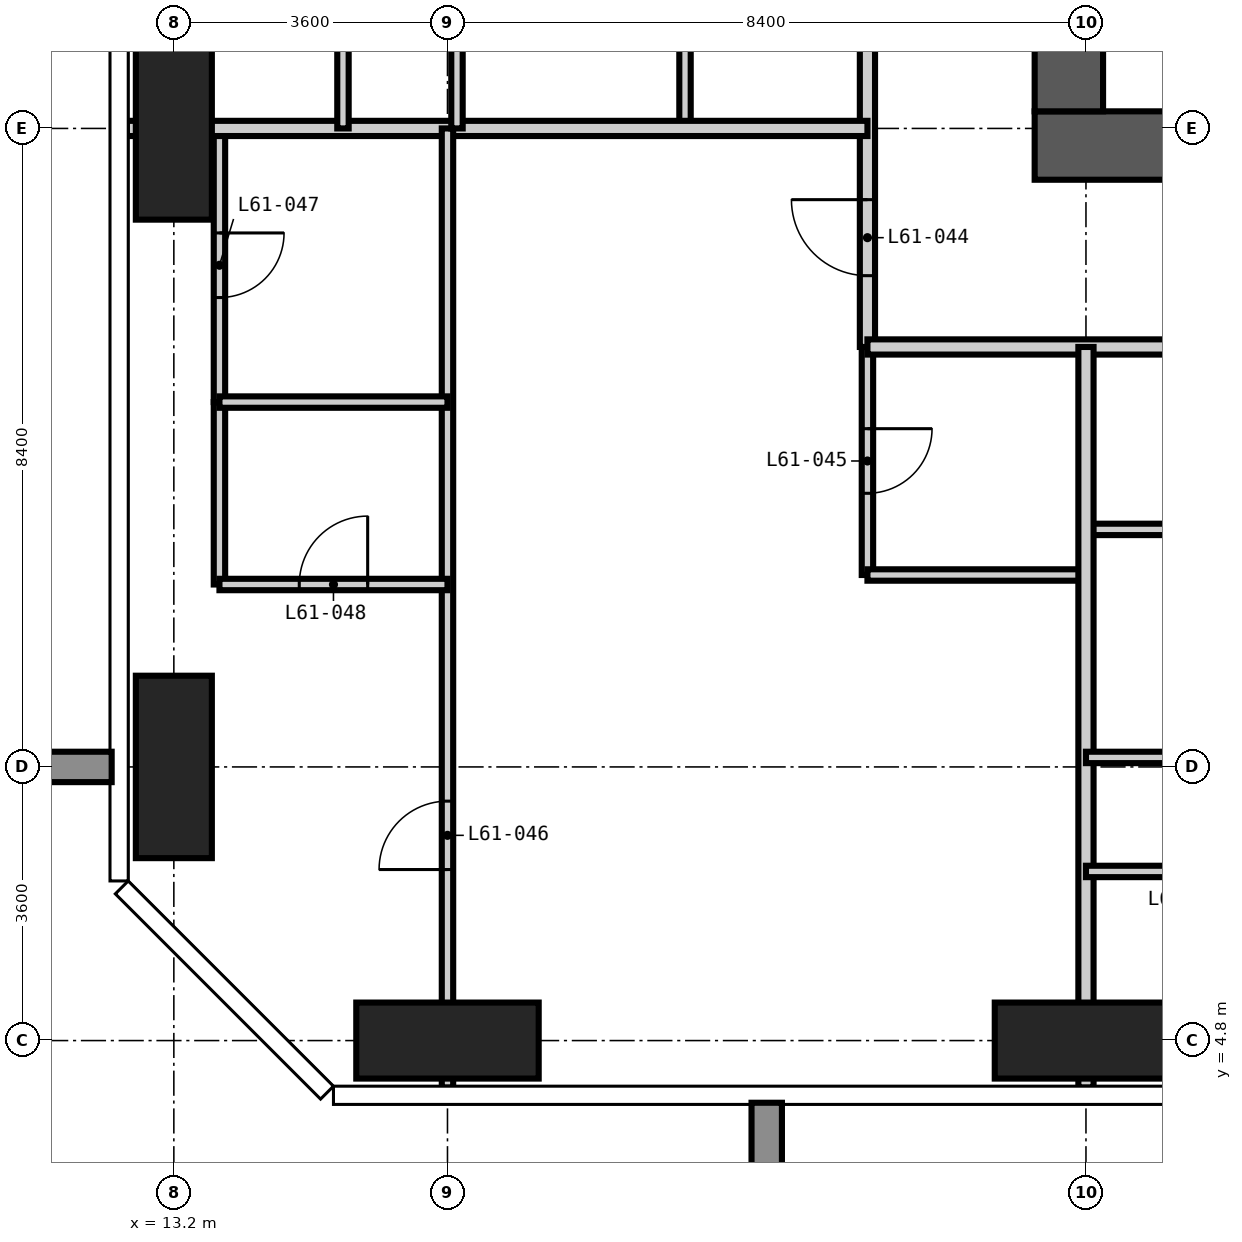
"""IFC4 building model, lengths in metres.
Left out: names, types, materials, properties, quantities, classifications, styles, units other than length and angle.
Written with IfcOpenShell. Run it as: python <this file> out.ifc"""

import sys

from ifc_helpers import new_model, si_unit, direction, frame, frame_2d, origin, origin_2d, place, context, subcontext, project, spatial, rectangle, extrude, element, fill, save


model = new_model("IFC4")
c1 = context("Model", 3, precision=1e-05, world=origin(), true_north=direction((0.0, 1.0)))
c2 = subcontext(c1, "Body", "Model", "MODEL_VIEW")
j1 = project(units=[si_unit("LENGTHUNIT", "METRE"), si_unit("PLANEANGLEUNIT", "RADIAN")], contexts=[c1])
p1 = place(None, origin())
s1 = spatial("IfcSite", under=j1, at=p1, CompositionType="ELEMENT")
p2 = place(p1, origin())
s2 = spatial("IfcBuilding", under=s1, at=p2, CompositionType="ELEMENT")
p3 = place(p2, frame((0.0, 0.0, 237.3)))
s3 = spatial("IfcBuildingStorey", under=s2, at=p3, CompositionType="ELEMENT", Elevation=237.3)
for number, where, z_axis, x_axis in (
    (1, (13.2, 8.4, -0.35), (0.0, 0.0, 1.0), (1.0, 0.0, 0.0)),
    (2, (13.2, 16.8, -0.35), (0.0, 0.0, 1.0), (1.0, 0.0, 0.0)),
):
    element("IfcColumn", number, at=place(p3, frame(where, z_axis=z_axis, x_axis=x_axis)), inside=s3, PredefinedType="COLUMN", context=c2, shape_type="SweptSolid", body=[
        extrude(rectangle(XDim=1.0, YDim=2.4, at=origin_2d()), origin(), (0.0, 0.0, 1.0), 3.9),
    ])
for number, where, z_axis, x_axis in (
    (3, (16.8, 4.8, -0.35), (0.0, 0.0, 1.0), (1.0, 0.0, 0.0)),
    (4, (25.2, 4.8, -0.35), (0.0, 0.0, 1.0), (1.0, 0.0, 0.0)),
):
    element("IfcColumn", number, at=place(p3, frame(where, z_axis=z_axis, x_axis=x_axis)), inside=s3, PredefinedType="COLUMN", context=c2, shape_type="SweptSolid", body=[
        extrude(rectangle(XDim=2.4, YDim=1.0, at=origin_2d()), origin(), (0.0, 0.0, 1.0), 3.9),
    ])
p4 = place(p3, frame((24.525, 16.575, -0.35), z_axis=(0.0, 0.0, 1.0), x_axis=(1.0, 0.0, 0.0)))
e5 = element("IfcWall", 5, at=p4, inside=s3, PredefinedType="SHEAR", context=c2, shape_type="SweptSolid", body=[
    extrude(rectangle(XDim=18.15, YDim=0.9, at=frame_2d((9.075, 0.0))), origin(), (0.0, 0.0, 1.0), 3.9),
])
p5 = place(p4, frame((4.375, 0.0, 0.35)))
e6 = element("IfcOpeningElement", 6, at=p5, cuts=e5, PredefinedType="OPENING", context=c2, shape_type="SweptSolid", body=[
    extrude(rectangle(XDim=1.0, YDim=2.1, at=frame_2d((0.5, 1.05))), frame((0.0, 0.46, 0.0), z_axis=(0.0, -1.0, 0.0), x_axis=(1.0, 0.0, 0.0)), (0.0, 0.0, 1.0), 0.92),
])
p6 = place(p4, frame((10.675, 0.0, 0.35)))
e7 = element("IfcOpeningElement", 7, at=p6, cuts=e5, PredefinedType="OPENING", context=c2, shape_type="SweptSolid", body=[
    extrude(rectangle(XDim=1.0, YDim=2.1, at=frame_2d((0.5, 1.05))), frame((0.0, 0.46, 0.0), z_axis=(0.0, -1.0, 0.0), x_axis=(1.0, 0.0, 0.0)), (0.0, 0.0, 1.0), 0.92),
])
p7 = place(p3, frame((24.975, 41.775, -0.35), z_axis=(0.0, 0.0, 1.0), x_axis=(0.0, -1.0, 0.0)))
e8 = element("IfcWall", 8, at=p7, inside=s3, PredefinedType="SHEAR", context=c2, shape_type="SweptSolid", body=[
    extrude(rectangle(XDim=24.75, YDim=0.9, at=frame_2d((12.375, 0.0))), origin(), (0.0, 0.0, 1.0), 3.9),
])
p8 = place(p7, frame((11.875, 0.0, 0.35)))
e9 = element("IfcOpeningElement", 9, at=p8, cuts=e8, PredefinedType="OPENING", context=c2, shape_type="SweptSolid", body=[
    extrude(rectangle(XDim=1.0, YDim=2.1, at=frame_2d((0.5, 1.05))), frame((0.0, 0.46, 0.0), z_axis=(0.0, -1.0, 0.0), x_axis=(1.0, 0.0, 0.0)), (0.0, 0.0, 1.0), 0.92),
])
p9 = place(p3, frame((13.8, 13.2, 0.0), z_axis=(0.0, 0.0, 1.0), x_axis=(0.0, 1.0, 0.0)))
e10 = element("IfcWall", 10, at=p9, inside=s3, PredefinedType="PARTITIONING", context=c2, shape_type="SweptSolid", body=[
    extrude(rectangle(XDim=3.6, YDim=0.15, at=frame_2d((1.8, 0.0))), origin(), (0.0, 0.0, 1.0), 3.55),
])
p10 = place(p9, frame((1.375, 0.0, 0.0)))
e11 = element("IfcOpeningElement", 11, at=p10, cuts=e10, PredefinedType="OPENING", context=c2, shape_type="SweptSolid", body=[
    extrude(rectangle(XDim=0.85, YDim=2.1, at=frame_2d((0.425, 1.05))), frame((0.0, 0.085, 0.0), z_axis=(0.0, -1.0, 0.0), x_axis=(1.0, 0.0, 0.0)), (0.0, 0.0, 1.0), 0.17),
])
p11 = place(p3, frame((19.925, 16.8, 0.0), z_axis=(0.0, 0.0, 1.0), x_axis=(0.0, 1.0, 0.0)))
e12 = element("IfcWall", 12, at=p11, inside=s3, PredefinedType="PARTITIONING", context=c2, shape_type="SweptSolid", body=[
    extrude(rectangle(XDim=3.0, YDim=0.15, at=frame_2d((1.5, 0.0))), origin(), (0.0, 0.0, 1.0), 3.55),
])
p12 = place(p11, frame((1.075, 0.0, 0.0)))
e13 = element("IfcOpeningElement", 13, at=p12, cuts=e12, PredefinedType="OPENING", context=c2, shape_type="SweptSolid", body=[
    extrude(rectangle(XDim=0.85, YDim=2.1, at=frame_2d((0.425, 1.05))), frame((0.0, 0.085, 0.0), z_axis=(0.0, -1.0, 0.0), x_axis=(1.0, 0.0, 0.0)), (0.0, 0.0, 1.0), 0.17),
])
p13 = place(p3, frame((22.325, 10.925, 0.0), z_axis=(0.0, 0.0, 1.0), x_axis=(0.0, 1.0, 0.0)))
e14 = element("IfcWall", 14, at=p13, inside=s3, PredefinedType="PARTITIONING", context=c2, shape_type="SweptSolid", body=[
    extrude(rectangle(XDim=3.0, YDim=0.15, at=frame_2d((1.5, 0.0))), origin(), (0.0, 0.0, 1.0), 3.55),
])
p14 = place(p13, frame((1.075, 0.0, 0.0)))
e15 = element("IfcOpeningElement", 15, at=p14, cuts=e14, PredefinedType="OPENING", context=c2, shape_type="SweptSolid", body=[
    extrude(rectangle(XDim=0.85, YDim=2.1, at=frame_2d((0.425, 1.05))), frame((0.0, 0.085, 0.0), z_axis=(0.0, -1.0, 0.0), x_axis=(1.0, 0.0, 0.0)), (0.0, 0.0, 1.0), 0.17),
])
p15 = place(p3, frame((22.325, 10.925, 0.0), z_axis=(0.0, 0.0, 1.0), x_axis=(1.0, 0.0, 0.0)))
e16 = element("IfcWall", 16, at=p15, inside=s3, PredefinedType="PARTITIONING", context=c2, shape_type="SweptSolid", body=[
    extrude(rectangle(XDim=2.875, YDim=0.15, at=frame_2d((1.438, 0.0))), origin(), (0.0, 0.0, 1.0), 3.55),
])
p16 = place(p3, frame((25.2, 11.525, 0.0), z_axis=(0.0, 0.0, 1.0), x_axis=(1.0, 0.0, 0.0)))
e17 = element("IfcWall", 17, at=p16, inside=s3, PredefinedType="PARTITIONING", context=c2, shape_type="SweptSolid", body=[
    extrude(rectangle(XDim=3.0, YDim=0.15, at=frame_2d((1.5, 0.0))), origin(), (0.0, 0.0, 1.0), 3.55),
])
p17 = place(p3, frame((22.325, 13.925, 0.0), z_axis=(0.0, 0.0, 1.0), x_axis=(0.0, 1.0, 0.0)))
e18 = element("IfcWall", 18, at=p17, inside=s3, PredefinedType="PARTITIONING", context=c2, shape_type="SweptSolid", body=[
    extrude(rectangle(XDim=30.65, YDim=0.2, at=frame_2d((15.325, 0.0))), origin(), (0.0, 0.0, 1.0), 3.55),
])
p18 = place(p17, frame((8.675, 0.0, 0.0)))
e19 = element("IfcOpeningElement", 19, at=p18, cuts=e18, PredefinedType="OPENING", context=c2, shape_type="SweptSolid", body=[
    extrude(rectangle(XDim=1.0, YDim=2.2, at=frame_2d((0.5, 1.1))), frame((0.0, 0.11, 0.0), z_axis=(0.0, -1.0, 0.0), x_axis=(1.0, 0.0, 0.0)), (0.0, 0.0, 1.0), 0.22),
])
p19 = place(p17, frame((21.275, 0.0, 0.0)))
e20 = element("IfcOpeningElement", 20, at=p19, cuts=e18, PredefinedType="OPENING", context=c2, shape_type="SweptSolid", body=[
    extrude(rectangle(XDim=1.0, YDim=2.2, at=frame_2d((0.5, 1.1))), frame((0.0, 0.11, 0.0), z_axis=(0.0, -1.0, 0.0), x_axis=(1.0, 0.0, 0.0)), (0.0, 0.0, 1.0), 0.22),
])
p20 = place(p17, frame((0.938, 0.0, 0.0)))
e21 = element("IfcOpeningElement", 21, at=p20, cuts=e18, PredefinedType="OPENING", context=c2, shape_type="SweptSolid", body=[
    extrude(rectangle(XDim=1.0, YDim=2.2, at=frame_2d((0.5, 1.1))), frame((0.0, 0.11, 0.0), z_axis=(0.0, -1.0, 0.0), x_axis=(1.0, 0.0, 0.0)), (0.0, 0.0, 1.0), 0.22),
])
p21 = place(p17, frame((28.863, 0.0, 0.0)))
e22 = element("IfcOpeningElement", 22, at=p21, cuts=e18, PredefinedType="OPENING", context=c2, shape_type="SweptSolid", body=[
    extrude(rectangle(XDim=1.0, YDim=2.2, at=frame_2d((0.5, 1.1))), frame((0.0, 0.11, 0.0), z_axis=(0.0, -1.0, 0.0), x_axis=(1.0, 0.0, 0.0)), (0.0, 0.0, 1.0), 0.22),
])
p22 = place(p3, frame((45.175, 13.925, 0.0), z_axis=(0.0, 0.0, 1.0), x_axis=(-1.0, 0.0, 0.0)))
e23 = element("IfcWall", 23, at=p22, inside=s3, PredefinedType="PARTITIONING", context=c2, shape_type="SweptSolid", body=[
    extrude(rectangle(XDim=22.85, YDim=0.2, at=frame_2d((11.425, 0.0))), origin(), (0.0, 0.0, 1.0), 3.55),
])
p23 = place(p22, frame((15.275, 0.0, 0.0)))
e24 = element("IfcOpeningElement", 24, at=p23, cuts=e23, PredefinedType="OPENING", context=c2, shape_type="SweptSolid", body=[
    extrude(rectangle(XDim=1.0, YDim=2.2, at=frame_2d((0.5, 1.1))), frame((0.0, 0.11, 0.0), z_axis=(0.0, -1.0, 0.0), x_axis=(1.0, 0.0, 0.0)), (0.0, 0.0, 1.0), 0.22),
])
p24 = place(p22, frame((6.875, 0.0, 0.0)))
e25 = element("IfcOpeningElement", 25, at=p24, cuts=e23, PredefinedType="OPENING", context=c2, shape_type="SweptSolid", body=[
    extrude(rectangle(XDim=1.0, YDim=2.2, at=frame_2d((0.5, 1.1))), frame((0.0, 0.11, 0.0), z_axis=(0.0, -1.0, 0.0), x_axis=(1.0, 0.0, 0.0)), (0.0, 0.0, 1.0), 0.22),
])
p25 = place(p3, frame((25.2, 4.182, 0.0), z_axis=(0.0, 0.0, 1.0), x_axis=(0.0, 1.0, 0.0)))
e26 = element("IfcWall", 26, at=p25, inside=s3, PredefinedType="PARTITIONING", context=c2, shape_type="SweptSolid", body=[
    extrude(rectangle(XDim=9.743, YDim=0.2, at=frame_2d((4.872, 0.0))), origin(), (0.0, 0.0, 1.0), 3.55),
])
p26 = place(p3, frame((12.582, 16.8, 0.0), z_axis=(0.0, 0.0, 1.0), x_axis=(1.0, 0.0, 0.0)))
e27 = element("IfcWall", 27, at=p26, inside=s3, PredefinedType="PARTITIONING", context=c2, shape_type="SweptSolid", body=[
    extrude(rectangle(XDim=9.743, YDim=0.2, at=frame_2d((4.872, 0.0))), origin(), (0.0, 0.0, 1.0), 3.55),
])
p27 = place(p3, frame((13.8, 10.8, 0.0), z_axis=(0.0, 0.0, 1.0), x_axis=(0.0, 1.0, 0.0)))
e28 = element("IfcWall", 28, at=p27, inside=s3, PredefinedType="PARTITIONING", context=c2, shape_type="SweptSolid", body=[
    extrude(rectangle(XDim=2.4, YDim=0.15, at=frame_2d((1.2, 0.0))), origin(), (0.0, 0.0, 1.0), 3.55),
])
p28 = place(p3, frame((15.425, 16.8, 0.0), z_axis=(0.0, 0.0, 1.0), x_axis=(0.0, 1.0, 0.0)))
e29 = element("IfcWall", 29, at=p28, inside=s3, PredefinedType="PARTITIONING", context=c2, shape_type="SweptSolid", body=[
    extrude(rectangle(XDim=3.0, YDim=0.15, at=frame_2d((1.5, 0.0))), origin(), (0.0, 0.0, 1.0), 3.55),
])
p29 = place(p28, frame((1.05, 0.0, 0.0)))
e30 = element("IfcOpeningElement", 30, at=p29, cuts=e29, PredefinedType="OPENING", context=c2, shape_type="SweptSolid", body=[
    extrude(rectangle(XDim=0.9, YDim=2.1, at=frame_2d((0.45, 1.05))), frame((0.0, 0.085, 0.0), z_axis=(0.0, -1.0, 0.0), x_axis=(1.0, 0.0, 0.0)), (0.0, 0.0, 1.0), 0.17),
])
p30 = place(p3, frame((16.8, 4.182, 0.0), z_axis=(0.0, 0.0, 1.0), x_axis=(0.0, 1.0, 0.0)))
e31 = element("IfcWall", 31, at=p30, inside=s3, PredefinedType="PARTITIONING", context=c2, shape_type="SweptSolid", body=[
    extrude(rectangle(XDim=12.618, YDim=0.15, at=frame_2d((6.309, 0.0))), origin(), (0.0, 0.0, 1.0), 3.55),
])
p31 = place(p30, frame((2.868, 0.0, 0.0)))
e32 = element("IfcOpeningElement", 32, at=p31, cuts=e31, PredefinedType="OPENING", context=c2, shape_type="SweptSolid", body=[
    extrude(rectangle(XDim=0.9, YDim=2.1, at=frame_2d((0.45, 1.05))), frame((0.0, 0.085, 0.0), z_axis=(0.0, -1.0, 0.0), x_axis=(1.0, 0.0, 0.0)), (0.0, 0.0, 1.0), 0.17),
])
p32 = place(p3, frame((16.925, 16.8, 0.0), z_axis=(0.0, 0.0, 1.0), x_axis=(0.0, 1.0, 0.0)))
e33 = element("IfcWall", 33, at=p32, inside=s3, PredefinedType="PARTITIONING", context=c2, shape_type="SweptSolid", body=[
    extrude(rectangle(XDim=3.0, YDim=0.15, at=frame_2d((1.5, 0.0))), origin(), (0.0, 0.0, 1.0), 3.55),
])
p33 = place(p3, frame((25.2, 7.025, 0.0), z_axis=(0.0, 0.0, 1.0), x_axis=(1.0, 0.0, 0.0)))
e34 = element("IfcWall", 34, at=p33, inside=s3, PredefinedType="PARTITIONING", context=c2, shape_type="SweptSolid", body=[
    extrude(rectangle(XDim=3.0, YDim=0.15, at=frame_2d((1.5, 0.0))), origin(), (0.0, 0.0, 1.0), 3.55),
])
p34 = place(p33, frame((1.05, 0.0, 0.0)))
e35 = element("IfcOpeningElement", 35, at=p34, cuts=e34, PredefinedType="OPENING", context=c2, shape_type="SweptSolid", body=[
    extrude(rectangle(XDim=0.9, YDim=2.1, at=frame_2d((0.45, 1.05))), frame((0.0, 0.085, 0.0), z_axis=(0.0, -1.0, 0.0), x_axis=(1.0, 0.0, 0.0)), (0.0, 0.0, 1.0), 0.17),
])
p35 = place(p3, frame((25.2, 8.525, 0.0), z_axis=(0.0, 0.0, 1.0), x_axis=(1.0, 0.0, 0.0)))
e36 = element("IfcWall", 36, at=p35, inside=s3, PredefinedType="PARTITIONING", context=c2, shape_type="SweptSolid", body=[
    extrude(rectangle(XDim=3.0, YDim=0.15, at=frame_2d((1.5, 0.0))), origin(), (0.0, 0.0, 1.0), 3.55),
])
p36 = place(p3, frame((13.8, 10.8, 0.0), z_axis=(0.0, 0.0, 1.0), x_axis=(1.0, 0.0, 0.0)))
e37 = element("IfcWall", 37, at=p36, inside=s3, PredefinedType="PARTITIONING", context=c2, shape_type="SweptSolid", body=[
    extrude(rectangle(XDim=3.0, YDim=0.15, at=frame_2d((1.5, 0.0))), origin(), (0.0, 0.0, 1.0), 3.55),
])
p37 = place(p36, frame((1.05, 0.0, 0.0)))
e38 = element("IfcOpeningElement", 38, at=p37, cuts=e37, PredefinedType="OPENING", context=c2, shape_type="SweptSolid", body=[
    extrude(rectangle(XDim=0.9, YDim=2.1, at=frame_2d((0.45, 1.05))), frame((0.0, 0.085, 0.0), z_axis=(0.0, -1.0, 0.0), x_axis=(1.0, 0.0, 0.0)), (0.0, 0.0, 1.0), 0.17),
])
p38 = place(p3, frame((13.8, 13.2, 0.0), z_axis=(0.0, 0.0, 1.0), x_axis=(1.0, 0.0, 0.0)))
e39 = element("IfcWall", 39, at=p38, inside=s3, PredefinedType="PARTITIONING", context=c2, shape_type="SweptSolid", body=[
    extrude(rectangle(XDim=3.0, YDim=0.15, at=frame_2d((1.5, 0.0))), origin(), (0.0, 0.0, 1.0), 3.55),
])
p39 = place(p20, origin())
e40 = element("IfcDoor", 40, at=p39, inside=s3, OperationType="SINGLE_SWING_RIGHT", PredefinedType="DOOR", context=c2, shape_type="SweptSolid", body=[
    extrude(rectangle(XDim=1.0, YDim=2.2, at=frame_2d((0.5, 1.1))), frame((0.0, 0.025, 0.0), z_axis=(0.0, -1.0, 0.0), x_axis=(1.0, 0.0, 0.0)), (0.0, 0.0, 1.0), 0.05),
])
fill(e21, e40)
p40 = place(p14, frame((0.85, 0.0, 0.0), z_axis=(0.0, 0.0, 1.0), x_axis=(-1.0, 0.0, 0.0)))
e41 = element("IfcDoor", 41, at=p40, inside=s3, OperationType="SINGLE_SWING_LEFT", PredefinedType="DOOR", context=c2, shape_type="SweptSolid", body=[
    extrude(rectangle(XDim=0.85, YDim=2.1, at=frame_2d((0.425, 1.05))), frame((0.0, 0.025, 0.0), z_axis=(0.0, -1.0, 0.0), x_axis=(1.0, 0.0, 0.0)), (0.0, 0.0, 1.0), 0.05),
])
fill(e15, e41)
p41 = place(p31, origin())
e42 = element("IfcDoor", 42, at=p41, inside=s3, OperationType="SINGLE_SWING_LEFT", PredefinedType="DOOR", context=c2, shape_type="SweptSolid", body=[
    extrude(rectangle(XDim=0.9, YDim=2.1, at=frame_2d((0.45, 1.05))), frame((0.0, 0.025, 0.0), z_axis=(0.0, -1.0, 0.0), x_axis=(1.0, 0.0, 0.0)), (0.0, 0.0, 1.0), 0.05),
])
fill(e32, e42)
p42 = place(p10, frame((0.85, 0.0, 0.0), z_axis=(0.0, 0.0, 1.0), x_axis=(-1.0, 0.0, 0.0)))
e43 = element("IfcDoor", 43, at=p42, inside=s3, OperationType="SINGLE_SWING_LEFT", PredefinedType="DOOR", context=c2, shape_type="SweptSolid", body=[
    extrude(rectangle(XDim=0.85, YDim=2.1, at=frame_2d((0.425, 1.05))), frame((0.0, 0.025, 0.0), z_axis=(0.0, -1.0, 0.0), x_axis=(1.0, 0.0, 0.0)), (0.0, 0.0, 1.0), 0.05),
])
fill(e11, e43)
p43 = place(p37, origin())
e44 = element("IfcDoor", 44, at=p43, inside=s3, OperationType="SINGLE_SWING_RIGHT", PredefinedType="DOOR", context=c2, shape_type="SweptSolid", body=[
    extrude(rectangle(XDim=0.9, YDim=2.1, at=frame_2d((0.45, 1.05))), frame((0.0, 0.025, 0.0), z_axis=(0.0, -1.0, 0.0), x_axis=(1.0, 0.0, 0.0)), (0.0, 0.0, 1.0), 0.05),
])
fill(e38, e44)
save(model, sys.argv[1])
